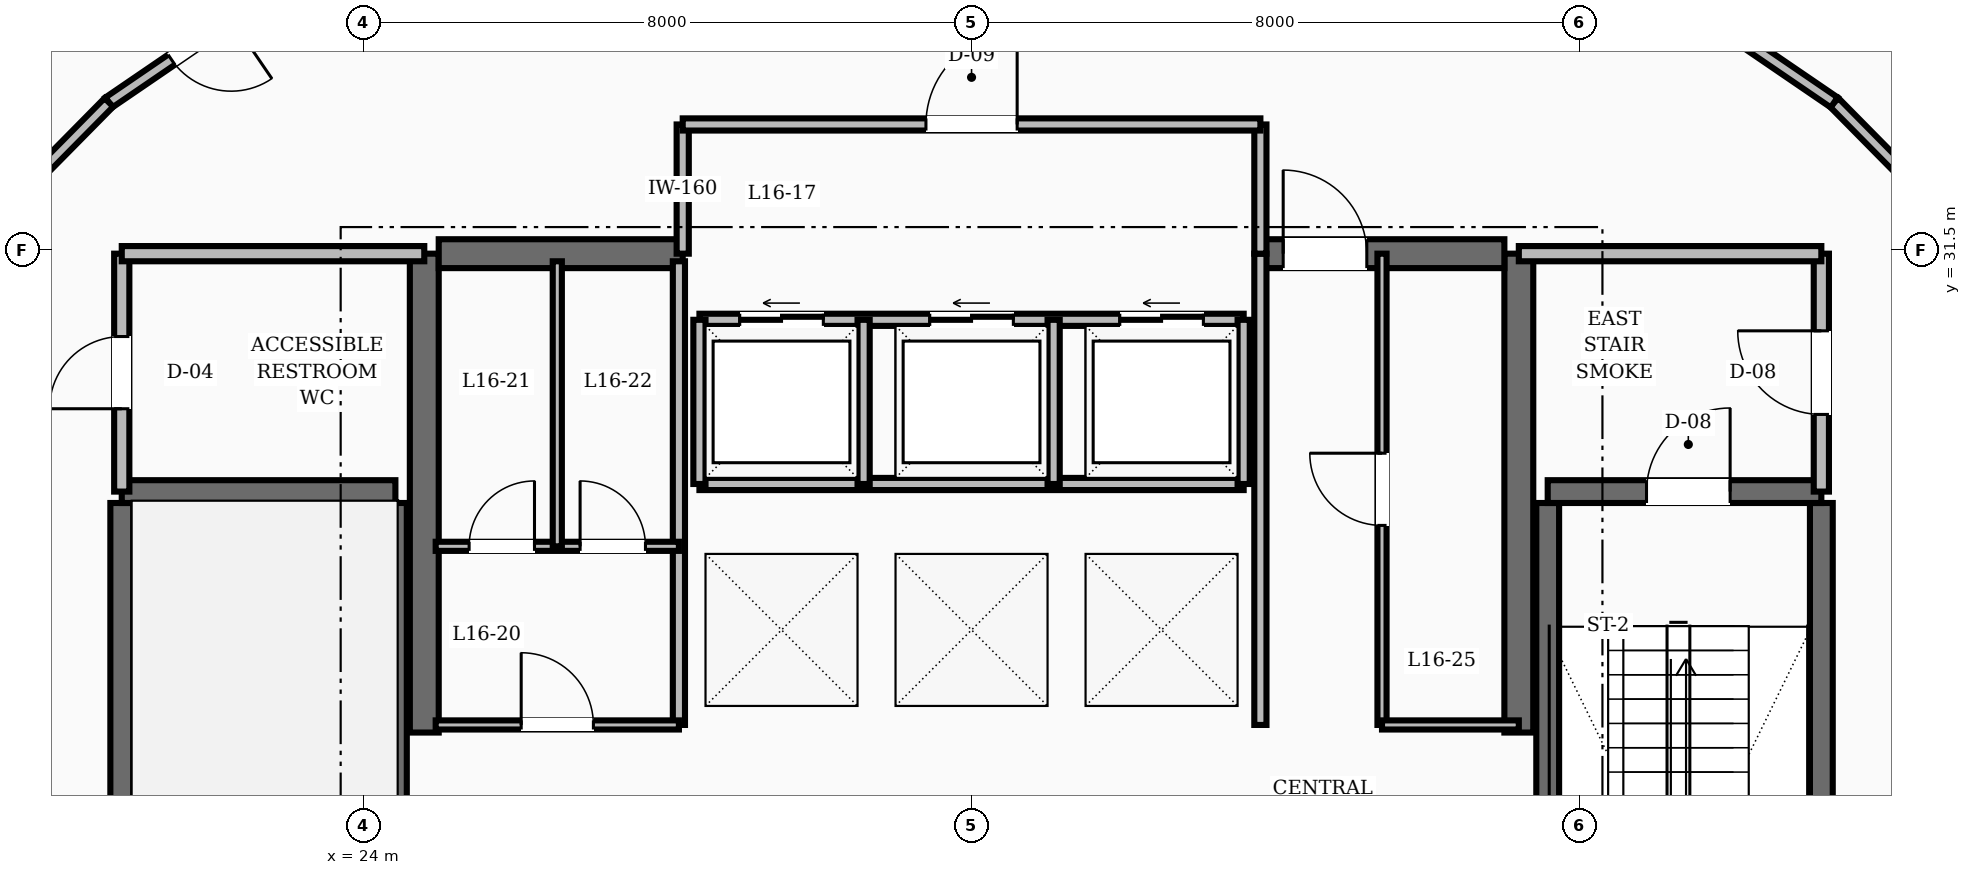
"""IFC4 building model, lengths in metres.
Left out: names, types, materials, properties, quantities, classifications, styles, units other than length and angle.
Written with IfcOpenShell. Run it as: python <this file> out.ifc"""

import sys

from ifc_helpers import new_model, si_unit, direction, frame, frame_2d, origin, place, context, subcontext, project, spatial, rectangle, extrude, element, fill, save


model = new_model("IFC4")
c1 = context("Model", 3, precision=1e-05, world=origin(), true_north=direction((0.0, 1.0)))
c2 = subcontext(c1, "Body", "Model", "MODEL_VIEW")
j1 = project(units=[si_unit("LENGTHUNIT", "METRE"), si_unit("PLANEANGLEUNIT", "RADIAN")], contexts=[c1])
p1 = place(None, origin())
s1 = spatial("IfcSite", under=j1, at=p1, CompositionType="ELEMENT")
p2 = place(p1, origin())
s2 = spatial("IfcBuilding", under=s1, at=p2, CompositionType="ELEMENT")
p3 = place(p2, frame((0.0, 0.0, 66.4)))
s3 = spatial("IfcBuildingStorey", under=s2, at=p3, CompositionType="ELEMENT", Elevation=66.4)
for number, where, z_axis, x_axis in (
    (1, (24.8, 25.15, 0.0), (0.0, 0.0, 1.0), (0.0, 1.0, 0.0)),
    (2, (39.2, 25.15, 0.0), (0.0, 0.0, 1.0), (0.0, 1.0, 0.0)),
):
    element("IfcWall", number, at=place(p3, frame(where, z_axis=z_axis, x_axis=x_axis)), inside=s3, PredefinedType="SHEAR", context=c2, shape_type="SweptSolid", body=[
        extrude(rectangle(XDim=6.3, YDim=0.38, at=frame_2d((3.15, 0.0))), origin(), (0.0, 0.0, 1.0), 3.6),
    ])
p4 = place(p3, frame((24.99, 31.45, 0.0), z_axis=(0.0, 0.0, 1.0), x_axis=(1.0, 0.0, 0.0)))
e3 = element("IfcWall", 3, at=p4, inside=s3, PredefinedType="SHEAR", context=c2, shape_type="SweptSolid", body=[
    extrude(rectangle(XDim=3.21, YDim=0.38, at=frame_2d((1.605, 0.0))), origin(), (0.0, 0.0, 1.0), 3.6),
])
p5 = place(p3, frame((35.8, 31.45, 0.0), z_axis=(0.0, 0.0, 1.0), x_axis=(1.0, 0.0, 0.0)))
e4 = element("IfcWall", 4, at=p5, inside=s3, PredefinedType="SHEAR", context=c2, shape_type="SweptSolid", body=[
    extrude(rectangle(XDim=3.21, YDim=0.38, at=frame_2d((1.605, 0.0))), origin(), (0.0, 0.0, 1.0), 3.6),
])
p6 = place(p5, frame((0.3, 0.0, 0.0)))
e5 = element("IfcOpeningElement", 5, at=p6, cuts=e4, PredefinedType="OPENING", context=c2, shape_type="SweptSolid", body=[
    extrude(rectangle(XDim=1.1, YDim=2.1, at=frame_2d((0.55, 1.05))), frame((0.0, 0.2, 0.0), z_axis=(0.0, -1.0, 0.0), x_axis=(1.0, 0.0, 0.0)), (0.0, 0.0, 1.0), 0.4),
])
for number, where, z_axis, x_axis in (
    (6, (20.82, 19.43, 0.0), (0.0, 0.0, 1.0), (0.0, 1.0, 0.0)),
    (7, (24.42, 19.43, 0.0), (0.0, 0.0, 1.0), (0.0, 1.0, 0.0)),
):
    element("IfcWall", number, at=place(p3, frame(where, z_axis=z_axis, x_axis=x_axis)), inside=s3, PredefinedType="SHEAR", context=c2, shape_type="SweptSolid", body=[
        extrude(rectangle(XDim=8.74, YDim=0.3, at=frame_2d((4.37, 0.0))), origin(), (0.0, 0.0, 1.0), 3.6),
    ])
p7 = place(p3, frame((20.82, 28.32, 0.0), z_axis=(0.0, 0.0, 1.0), x_axis=(1.0, 0.0, 0.0)))
e8 = element("IfcWall", 8, at=p7, inside=s3, PredefinedType="SHEAR", context=c2, shape_type="SweptSolid", body=[
    extrude(rectangle(XDim=3.6, YDim=0.3, at=frame_2d((1.8, 0.0))), origin(), (0.0, 0.0, 1.0), 3.6),
])
for number, where, z_axis, x_axis in (
    (9, (43.18, 19.43, 0.0), (0.0, 0.0, 1.0), (0.0, 1.0, 0.0)),
    (10, (39.58, 19.43, 0.0), (0.0, 0.0, 1.0), (0.0, 1.0, 0.0)),
):
    element("IfcWall", number, at=place(p3, frame(where, z_axis=z_axis, x_axis=x_axis)), inside=s3, PredefinedType="SHEAR", context=c2, shape_type="SweptSolid", body=[
        extrude(rectangle(XDim=8.74, YDim=0.3, at=frame_2d((4.37, 0.0))), origin(), (0.0, 0.0, 1.0), 3.6),
    ])
p8 = place(p3, frame((39.58, 28.32, 0.0), z_axis=(0.0, 0.0, 1.0), x_axis=(1.0, 0.0, 0.0)))
e11 = element("IfcWall", 11, at=p8, inside=s3, PredefinedType="SHEAR", context=c2, shape_type="SweptSolid", body=[
    extrude(rectangle(XDim=3.6, YDim=0.3, at=frame_2d((1.8, 0.0))), origin(), (0.0, 0.0, 1.0), 3.6),
])
p9 = place(p8, frame((1.3, 0.0, 0.0)))
e12 = element("IfcOpeningElement", 12, at=p9, cuts=e11, PredefinedType="OPENING", context=c2, shape_type="SweptSolid", body=[
    extrude(rectangle(XDim=1.1, YDim=2.1, at=frame_2d((0.55, 1.05))), frame((0.0, 0.16, 0.0), z_axis=(0.0, -1.0, 0.0), x_axis=(1.0, 0.0, 0.0)), (0.0, 0.0, 1.0), 0.32),
])
p10 = place(p3, frame((43.18, 28.32, 0.0), z_axis=(0.0, 0.0, 1.0), x_axis=(0.0, 1.0, 0.0)))
e13 = element("IfcWall", 13, at=p10, inside=s3, PredefinedType="SOLIDWALL", context=c2, shape_type="SweptSolid", body=[
    extrude(rectangle(XDim=3.13, YDim=0.2, at=frame_2d((1.565, 0.0))), origin(), (0.0, 0.0, 1.0), 2.71),
])
p11 = place(p10, frame((1.015, 0.0, 0.0)))
e14 = element("IfcOpeningElement", 14, at=p11, cuts=e13, PredefinedType="OPENING", context=c2, shape_type="SweptSolid", body=[
    extrude(rectangle(XDim=1.1, YDim=2.1, at=frame_2d((0.55, 1.05))), frame((0.0, 0.11, 0.0), z_axis=(0.0, -1.0, 0.0), x_axis=(1.0, 0.0, 0.0)), (0.0, 0.0, 1.0), 0.22),
])
p12 = place(p3, frame((39.2, 31.45, 0.0), z_axis=(0.0, 0.0, 1.0), x_axis=(1.0, 0.0, 0.0)))
e15 = element("IfcWall", 15, at=p12, inside=s3, PredefinedType="SOLIDWALL", context=c2, shape_type="SweptSolid", body=[
    extrude(rectangle(XDim=3.98, YDim=0.2, at=frame_2d((1.99, 0.0))), origin(), (0.0, 0.0, 1.0), 2.71),
])
p13 = place(p3, frame((20.82, 28.32, 0.0), z_axis=(0.0, 0.0, 1.0), x_axis=(0.0, 1.0, 0.0)))
e16 = element("IfcWall", 16, at=p13, inside=s3, PredefinedType="SOLIDWALL", context=c2, shape_type="SweptSolid", body=[
    extrude(rectangle(XDim=3.13, YDim=0.2, at=frame_2d((1.565, 0.0))), origin(), (0.0, 0.0, 1.0), 2.71),
])
p14 = place(p13, frame((1.09, 0.0, 0.0)))
e17 = element("IfcOpeningElement", 17, at=p14, cuts=e16, PredefinedType="OPENING", context=c2, shape_type="SweptSolid", body=[
    extrude(rectangle(XDim=0.95, YDim=2.1, at=frame_2d((0.475, 1.05))), frame((0.0, 0.11, 0.0), z_axis=(0.0, -1.0, 0.0), x_axis=(1.0, 0.0, 0.0)), (0.0, 0.0, 1.0), 0.22),
])
p15 = place(p3, frame((20.82, 31.45, 0.0), z_axis=(0.0, 0.0, 1.0), x_axis=(1.0, 0.0, 0.0)))
e18 = element("IfcWall", 18, at=p15, inside=s3, PredefinedType="SOLIDWALL", context=c2, shape_type="SweptSolid", body=[
    extrude(rectangle(XDim=3.98, YDim=0.2, at=frame_2d((1.99, 0.0))), origin(), (0.0, 0.0, 1.0), 2.71),
])
p16 = place(p3, frame((35.8, 25.25, 0.0), z_axis=(0.0, 0.0, 1.0), x_axis=(0.0, 1.0, 0.0)))
e19 = element("IfcWall", 19, at=p16, inside=s3, PredefinedType="SOLIDWALL", context=c2, shape_type="SweptSolid", body=[
    extrude(rectangle(XDim=6.2, YDim=0.16, at=frame_2d((3.1, 0.0))), origin(), (0.0, 0.0, 1.0), 2.71),
])
p17 = place(p3, frame((28.42, 30.58, 0.0), z_axis=(0.0, 0.0, 1.0), x_axis=(1.0, 0.0, 0.0)))
e20 = element("IfcWall", 20, at=p17, inside=s3, PredefinedType="SOLIDWALL", context=c2, shape_type="SweptSolid", body=[
    extrude(rectangle(XDim=7.16, YDim=0.16, at=frame_2d((3.58, 0.0))), origin(), (0.0, 0.0, 1.0), 2.71),
])
p18 = place(p17, frame((0.53, 0.0, 0.0)))
e21 = element("IfcOpeningElement", 21, at=p18, cuts=e20, PredefinedType="OPENING", context=c2, shape_type="SweptSolid", body=[
    extrude(rectangle(XDim=1.1, YDim=2.15, at=frame_2d((0.55, 1.075))), frame((0.0, 0.09, 0.0), z_axis=(0.0, -1.0, 0.0), x_axis=(1.0, 0.0, 0.0)), (0.0, 0.0, 1.0), 0.18),
])
p19 = place(p17, frame((3.03, 0.0, 0.0)))
e22 = element("IfcOpeningElement", 22, at=p19, cuts=e20, PredefinedType="OPENING", context=c2, shape_type="SweptSolid", body=[
    extrude(rectangle(XDim=1.1, YDim=2.15, at=frame_2d((0.55, 1.075))), frame((0.0, 0.09, 0.0), z_axis=(0.0, -1.0, 0.0), x_axis=(1.0, 0.0, 0.0)), (0.0, 0.0, 1.0), 0.18),
])
p20 = place(p17, frame((5.53, 0.0, 0.0)))
e23 = element("IfcOpeningElement", 23, at=p20, cuts=e20, PredefinedType="OPENING", context=c2, shape_type="SweptSolid", body=[
    extrude(rectangle(XDim=1.1, YDim=2.15, at=frame_2d((0.55, 1.075))), frame((0.0, 0.09, 0.0), z_axis=(0.0, -1.0, 0.0), x_axis=(1.0, 0.0, 0.0)), (0.0, 0.0, 1.0), 0.18),
])
p21 = place(p3, frame((28.42, 28.42, 0.0), z_axis=(0.0, 0.0, 1.0), x_axis=(1.0, 0.0, 0.0)))
e24 = element("IfcWall", 24, at=p21, inside=s3, PredefinedType="SOLIDWALL", context=c2, shape_type="SweptSolid", body=[
    extrude(rectangle(XDim=7.16, YDim=0.16, at=frame_2d((3.58, 0.0))), origin(), (0.0, 0.0, 1.0), 2.71),
])
for number, where, z_axis, x_axis in (
    (25, (28.42, 28.42, 0.0), (0.0, 0.0, 1.0), (0.0, 1.0, 0.0)),
    (26, (30.58, 28.42, 0.0), (0.0, 0.0, 1.0), (0.0, 1.0, 0.0)),
    (27, (33.08, 28.42, 0.0), (0.0, 0.0, 1.0), (0.0, 1.0, 0.0)),
    (28, (35.58, 28.42, 0.0), (0.0, 0.0, 1.0), (0.0, 1.0, 0.0)),
):
    element("IfcWall", number, at=place(p3, frame(where, z_axis=z_axis, x_axis=x_axis)), inside=s3, PredefinedType="SOLIDWALL", context=c2, shape_type="SweptSolid", body=[
        extrude(rectangle(XDim=2.16, YDim=0.16, at=frame_2d((1.08, 0.0))), origin(), (0.0, 0.0, 1.0), 2.71),
    ])
for number, where, z_axis, x_axis in (
    (29, (28.2, 31.45, 0.0), (0.0, 0.0, 1.0), (0.0, 1.0, 0.0)),
    (30, (35.8, 31.45, 0.0), (0.0, 0.0, 1.0), (0.0, 1.0, 0.0)),
):
    element("IfcWall", number, at=place(p3, frame(where, z_axis=z_axis, x_axis=x_axis)), inside=s3, PredefinedType="SOLIDWALL", context=c2, shape_type="SweptSolid", body=[
        extrude(rectangle(XDim=1.7, YDim=0.16, at=frame_2d((0.85, 0.0))), origin(), (0.0, 0.0, 1.0), 2.71),
    ])
p22 = place(p3, frame((28.2, 33.15, 0.0), z_axis=(0.0, 0.0, 1.0), x_axis=(1.0, 0.0, 0.0)))
e31 = element("IfcWall", 31, at=p22, inside=s3, PredefinedType="SOLIDWALL", context=c2, shape_type="SweptSolid", body=[
    extrude(rectangle(XDim=7.6, YDim=0.16, at=frame_2d((3.8, 0.0))), origin(), (0.0, 0.0, 1.0), 2.71),
])
p23 = place(p22, frame((3.2, 0.0, 0.0)))
e32 = element("IfcOpeningElement", 32, at=p23, cuts=e31, PredefinedType="OPENING", context=c2, shape_type="SweptSolid", body=[
    extrude(rectangle(XDim=1.2, YDim=2.1, at=frame_2d((0.6, 1.05))), frame((0.0, 0.09, 0.0), z_axis=(0.0, -1.0, 0.0), x_axis=(1.0, 0.0, 0.0)), (0.0, 0.0, 1.0), 0.18),
])
p24 = place(p3, frame((28.15, 25.25, 0.0), z_axis=(0.0, 0.0, 1.0), x_axis=(0.0, 1.0, 0.0)))
e33 = element("IfcWall", 33, at=p24, inside=s3, PredefinedType="SOLIDWALL", context=c2, shape_type="SweptSolid", body=[
    extrude(rectangle(XDim=6.1, YDim=0.16, at=frame_2d((3.05, 0.0))), origin(), (0.0, 0.0, 1.0), 2.71),
])
p25 = place(p3, frame((24.95, 25.25, 0.0), z_axis=(0.0, 0.0, 1.0), x_axis=(1.0, 0.0, 0.0)))
e34 = element("IfcWall", 34, at=p25, inside=s3, PredefinedType="PARTITIONING", context=c2, shape_type="SweptSolid", body=[
    extrude(rectangle(XDim=3.2, YDim=0.12, at=frame_2d((1.6, 0.0))), origin(), (0.0, 0.0, 1.0), 2.71),
])
p26 = place(p25, frame((1.125, 0.0, 0.0)))
e35 = element("IfcOpeningElement", 35, at=p26, cuts=e34, PredefinedType="OPENING", context=c2, shape_type="SweptSolid", body=[
    extrude(rectangle(XDim=0.95, YDim=2.1, at=frame_2d((0.475, 1.05))), frame((0.0, 0.07, 0.0), z_axis=(0.0, -1.0, 0.0), x_axis=(1.0, 0.0, 0.0)), (0.0, 0.0, 1.0), 0.14),
])
p27 = place(p3, frame((37.4, 25.25, 0.0), z_axis=(0.0, 0.0, 1.0), x_axis=(0.0, 1.0, 0.0)))
e36 = element("IfcWall", 36, at=p27, inside=s3, PredefinedType="PARTITIONING", context=c2, shape_type="SweptSolid", body=[
    extrude(rectangle(XDim=6.2, YDim=0.12, at=frame_2d((3.1, 0.0))), origin(), (0.0, 0.0, 1.0), 2.71),
])
p28 = place(p27, frame((2.625, 0.0, 0.0)))
e37 = element("IfcOpeningElement", 37, at=p28, cuts=e36, PredefinedType="OPENING", context=c2, shape_type="SweptSolid", body=[
    extrude(rectangle(XDim=0.95, YDim=2.1, at=frame_2d((0.475, 1.05))), frame((0.0, 0.07, 0.0), z_axis=(0.0, -1.0, 0.0), x_axis=(1.0, 0.0, 0.0)), (0.0, 0.0, 1.0), 0.14),
])
p29 = place(p3, frame((37.4, 25.25, 0.0), z_axis=(0.0, 0.0, 1.0), x_axis=(1.0, 0.0, 0.0)))
e38 = element("IfcWall", 38, at=p29, inside=s3, PredefinedType="PARTITIONING", context=c2, shape_type="SweptSolid", body=[
    extrude(rectangle(XDim=1.8, YDim=0.12, at=frame_2d((0.9, 0.0))), origin(), (0.0, 0.0, 1.0), 2.71),
])
p30 = place(p3, frame((24.95, 27.6, 0.0), z_axis=(0.0, 0.0, 1.0), x_axis=(1.0, 0.0, 0.0)))
e39 = element("IfcWall", 39, at=p30, inside=s3, PredefinedType="PARTITIONING", context=c2, shape_type="SweptSolid", body=[
    extrude(rectangle(XDim=3.2, YDim=0.12, at=frame_2d((1.6, 0.0))), origin(), (0.0, 0.0, 1.0), 2.71),
])
p31 = place(p30, frame((0.44, 0.0, 0.0)))
e40 = element("IfcOpeningElement", 40, at=p31, cuts=e39, PredefinedType="OPENING", context=c2, shape_type="SweptSolid", body=[
    extrude(rectangle(XDim=0.86, YDim=2.1, at=frame_2d((0.43, 1.05))), frame((0.0, 0.07, 0.0), z_axis=(0.0, -1.0, 0.0), x_axis=(1.0, 0.0, 0.0)), (0.0, 0.0, 1.0), 0.14),
])
p32 = place(p30, frame((1.9, 0.0, 0.0)))
e41 = element("IfcOpeningElement", 41, at=p32, cuts=e39, PredefinedType="OPENING", context=c2, shape_type="SweptSolid", body=[
    extrude(rectangle(XDim=0.86, YDim=2.1, at=frame_2d((0.43, 1.05))), frame((0.0, 0.07, 0.0), z_axis=(0.0, -1.0, 0.0), x_axis=(1.0, 0.0, 0.0)), (0.0, 0.0, 1.0), 0.14),
])
p33 = place(p3, frame((26.55, 27.6, 0.0), z_axis=(0.0, 0.0, 1.0), x_axis=(0.0, 1.0, 0.0)))
e42 = element("IfcWall", 42, at=p33, inside=s3, PredefinedType="PARTITIONING", context=c2, shape_type="SweptSolid", body=[
    extrude(rectangle(XDim=3.75, YDim=0.12, at=frame_2d((1.875, 0.0))), origin(), (0.0, 0.0, 1.0), 2.71),
])
p34 = place(p3, frame((45.345, 31.417, 0.0), z_axis=(0.0, 0.0, 1.0), x_axis=(-0.702366174226, 0.711815816981, 0.0)))
e43 = element("IfcWall", 43, at=p34, inside=s3, PredefinedType="SOLIDWALL", context=c2, shape_type="SweptSolid", body=[
    extrude(rectangle(XDim=2.842, YDim=0.16, at=frame_2d((1.421, 0.0))), origin(), (0.0, 0.0, 1.0), 2.71),
])
p35 = place(p3, frame((43.349, 33.44, 0.0), z_axis=(0.0, 0.0, 1.0), x_axis=(-0.825929039072, 0.563774088104, 0.0)))
e44 = element("IfcWall", 44, at=p35, inside=s3, PredefinedType="SOLIDWALL", context=c2, shape_type="SweptSolid", body=[
    extrude(rectangle(XDim=2.945, YDim=0.16, at=frame_2d((1.472, 0.0))), origin(), (0.0, 0.0, 1.0), 2.71),
])
p36 = place(p3, frame((23.083, 35.1, 0.0), z_axis=(0.0, 0.0, 1.0), x_axis=(-0.825929039072, -0.563774088104, 0.0)))
e45 = element("IfcWall", 45, at=p36, inside=s3, PredefinedType="SOLIDWALL", context=c2, shape_type="SweptSolid", body=[
    extrude(rectangle(XDim=2.945, YDim=0.16, at=frame_2d((1.472, 0.0))), origin(), (0.0, 0.0, 1.0), 2.71),
])
p37 = place(p36, frame((0.997, 0.0, 0.0)))
e46 = element("IfcOpeningElement", 46, at=p37, cuts=e45, PredefinedType="OPENING", context=c2, shape_type="SweptSolid", body=[
    extrude(rectangle(XDim=0.95, YDim=2.1, at=frame_2d((0.475, 1.05))), frame((0.0, 0.09, 0.0), z_axis=(0.0, -1.0, 0.0), x_axis=(1.0, 0.0, 0.0)), (0.0, 0.0, 1.0), 0.18),
])
p38 = place(p3, frame((20.651, 33.44, 0.0), z_axis=(0.0, 0.0, 1.0), x_axis=(-0.702366174226, -0.711815816981, 0.0)))
e47 = element("IfcWall", 47, at=p38, inside=s3, PredefinedType="SOLIDWALL", context=c2, shape_type="SweptSolid", body=[
    extrude(rectangle(XDim=2.842, YDim=0.16, at=frame_2d((1.421, 0.0))), origin(), (0.0, 0.0, 1.0), 2.71),
])
p39 = place(p9, origin())
e48 = element("IfcDoor", 48, at=p39, inside=s3, OperationType="SINGLE_SWING_RIGHT", PredefinedType="DOOR", context=c2, shape_type="SweptSolid", body=[
    extrude(rectangle(XDim=1.1, YDim=2.1, at=frame_2d((0.55, 1.05))), frame((0.0, 0.025, 0.0), z_axis=(0.0, -1.0, 0.0), x_axis=(1.0, 0.0, 0.0)), (0.0, 0.0, 1.0), 0.05),
])
fill(e12, e48)
p40 = place(p11, origin())
e49 = element("IfcDoor", 49, at=p40, inside=s3, OperationType="SINGLE_SWING_RIGHT", PredefinedType="DOOR", context=c2, shape_type="SweptSolid", body=[
    extrude(rectangle(XDim=1.1, YDim=2.1, at=frame_2d((0.55, 1.05))), frame((0.0, 0.025, 0.0), z_axis=(0.0, -1.0, 0.0), x_axis=(1.0, 0.0, 0.0)), (0.0, 0.0, 1.0), 0.05),
])
fill(e14, e49)
p41 = place(p14, origin())
e50 = element("IfcDoor", 50, at=p41, inside=s3, OperationType="SINGLE_SWING_LEFT", PredefinedType="DOOR", context=c2, shape_type="SweptSolid", body=[
    extrude(rectangle(XDim=0.95, YDim=2.1, at=frame_2d((0.475, 1.05))), frame((0.0, 0.025, 0.0), z_axis=(0.0, -1.0, 0.0), x_axis=(1.0, 0.0, 0.0)), (0.0, 0.0, 1.0), 0.05),
])
fill(e17, e50)
p42 = place(p6, origin())
e51 = element("IfcDoor", 51, at=p42, inside=s3, OperationType="SINGLE_SWING_LEFT", PredefinedType="DOOR", context=c2, shape_type="SweptSolid", body=[
    extrude(rectangle(XDim=1.1, YDim=2.1, at=frame_2d((0.55, 1.05))), frame((0.0, 0.025, 0.0), z_axis=(0.0, -1.0, 0.0), x_axis=(1.0, 0.0, 0.0)), (0.0, 0.0, 1.0), 0.05),
])
fill(e5, e51)
p43 = place(p18, origin())
e52 = element("IfcDoor", 52, at=p43, inside=s3, OperationType="SLIDING_TO_LEFT", PredefinedType="DOOR", context=c2, shape_type="SweptSolid", body=[
    extrude(rectangle(XDim=1.1, YDim=2.15, at=frame_2d((0.55, 1.075))), frame((0.0, 0.025, 0.0), z_axis=(0.0, -1.0, 0.0), x_axis=(1.0, 0.0, 0.0)), (0.0, 0.0, 1.0), 0.05),
])
fill(e21, e52)
p44 = place(p19, origin())
e53 = element("IfcDoor", 53, at=p44, inside=s3, OperationType="SLIDING_TO_LEFT", PredefinedType="DOOR", context=c2, shape_type="SweptSolid", body=[
    extrude(rectangle(XDim=1.1, YDim=2.15, at=frame_2d((0.55, 1.075))), frame((0.0, 0.025, 0.0), z_axis=(0.0, -1.0, 0.0), x_axis=(1.0, 0.0, 0.0)), (0.0, 0.0, 1.0), 0.05),
])
fill(e22, e53)
p45 = place(p20, origin())
e54 = element("IfcDoor", 54, at=p45, inside=s3, OperationType="SLIDING_TO_LEFT", PredefinedType="DOOR", context=c2, shape_type="SweptSolid", body=[
    extrude(rectangle(XDim=1.1, YDim=2.15, at=frame_2d((0.55, 1.075))), frame((0.0, 0.025, 0.0), z_axis=(0.0, -1.0, 0.0), x_axis=(1.0, 0.0, 0.0)), (0.0, 0.0, 1.0), 0.05),
])
fill(e23, e54)
p46 = place(p23, origin())
e55 = element("IfcDoor", 55, at=p46, inside=s3, OperationType="SINGLE_SWING_RIGHT", PredefinedType="DOOR", context=c2, shape_type="SweptSolid", body=[
    extrude(rectangle(XDim=1.2, YDim=2.1, at=frame_2d((0.6, 1.05))), frame((0.0, 0.025, 0.0), z_axis=(0.0, -1.0, 0.0), x_axis=(1.0, 0.0, 0.0)), (0.0, 0.0, 1.0), 0.05),
])
fill(e32, e55)
p47 = place(p26, origin())
e56 = element("IfcDoor", 56, at=p47, inside=s3, OperationType="SINGLE_SWING_LEFT", PredefinedType="DOOR", context=c2, shape_type="SweptSolid", body=[
    extrude(rectangle(XDim=0.95, YDim=2.1, at=frame_2d((0.475, 1.05))), frame((0.0, 0.025, 0.0), z_axis=(0.0, -1.0, 0.0), x_axis=(1.0, 0.0, 0.0)), (0.0, 0.0, 1.0), 0.05),
])
fill(e35, e56)
p48 = place(p31, origin())
e57 = element("IfcDoor", 57, at=p48, inside=s3, OperationType="SINGLE_SWING_RIGHT", PredefinedType="DOOR", context=c2, shape_type="SweptSolid", body=[
    extrude(rectangle(XDim=0.86, YDim=2.1, at=frame_2d((0.43, 1.05))), frame((0.0, 0.025, 0.0), z_axis=(0.0, -1.0, 0.0), x_axis=(1.0, 0.0, 0.0)), (0.0, 0.0, 1.0), 0.05),
])
fill(e40, e57)
p49 = place(p32, origin())
e58 = element("IfcDoor", 58, at=p49, inside=s3, OperationType="SINGLE_SWING_LEFT", PredefinedType="DOOR", context=c2, shape_type="SweptSolid", body=[
    extrude(rectangle(XDim=0.86, YDim=2.1, at=frame_2d((0.43, 1.05))), frame((0.0, 0.025, 0.0), z_axis=(0.0, -1.0, 0.0), x_axis=(1.0, 0.0, 0.0)), (0.0, 0.0, 1.0), 0.05),
])
fill(e41, e58)
p50 = place(p28, origin())
e59 = element("IfcDoor", 59, at=p50, inside=s3, OperationType="SINGLE_SWING_RIGHT", PredefinedType="DOOR", context=c2, shape_type="SweptSolid", body=[
    extrude(rectangle(XDim=0.95, YDim=2.1, at=frame_2d((0.475, 1.05))), frame((0.0, 0.025, 0.0), z_axis=(0.0, -1.0, 0.0), x_axis=(1.0, 0.0, 0.0)), (0.0, 0.0, 1.0), 0.05),
])
fill(e37, e59)
p51 = place(p37, origin())
e60 = element("IfcDoor", 60, at=p51, inside=s3, OperationType="SINGLE_SWING_LEFT", PredefinedType="DOOR", context=c2, shape_type="SweptSolid", body=[
    extrude(rectangle(XDim=0.95, YDim=2.1, at=frame_2d((0.475, 1.05))), frame((0.0, 0.025, 0.0), z_axis=(0.0, -1.0, 0.0), x_axis=(1.0, 0.0, 0.0)), (0.0, 0.0, 1.0), 0.05),
])
fill(e46, e60)
save(model, sys.argv[1])
